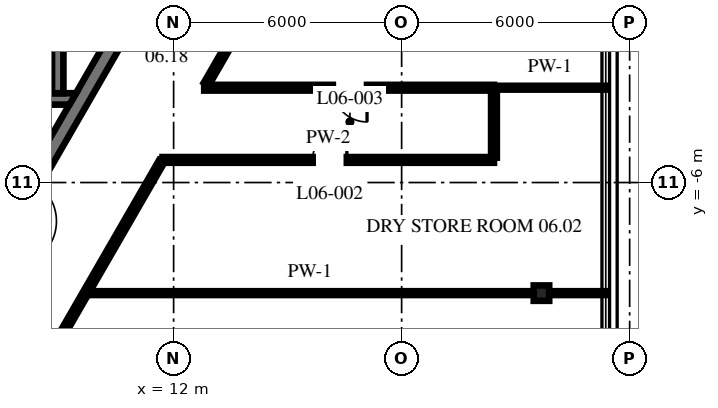
"""IFC4 building model, lengths in metres.
Left out: names, types, materials, properties, quantities, classifications, styles, units other than length and angle.
Written with IfcOpenShell. Run it as: python <this file> out.ifc"""

import sys

from ifc_helpers import new_model, si_unit, direction, frame, frame_2d, origin, origin_2d, place, context, subcontext, project, spatial, polyline, rectangle, i_section, outline, extrude, source, transform, mapped, element, fill, save


model = new_model("IFC4")
c1 = context("Model", 3, precision=1e-05, world=origin(), true_north=direction((0.0, 1.0)))
c2 = subcontext(c1, "Body", "Model", "MODEL_VIEW")
j1 = project(units=[si_unit("LENGTHUNIT", "METRE"), si_unit("PLANEANGLEUNIT", "RADIAN")], contexts=[c1])
p1 = place(None, origin())
s1 = spatial("IfcSite", under=j1, at=p1, CompositionType="ELEMENT")
p2 = place(p1, origin())
s2 = spatial("IfcBuilding", under=s1, at=p2, CompositionType="ELEMENT")
p3 = place(p2, frame((0.0, 0.0, 28.9)))
s3 = spatial("IfcBuildingStorey", under=s2, at=p3, CompositionType="ELEMENT", Elevation=28.9)
m1 = source(origin(), c2, "Body", "SweptSolid", [
    extrude(i_section(OverallWidth=0.404, OverallDepth=0.406, WebThickness=0.027, FlangeThickness=0.044, at=origin_2d()), origin(), (0.0, 0.0, 1.0), 4.3),
])
p4 = place(p3, frame((21.679, -8.91, 0.0), z_axis=(0.0, 0.0, 1.0), x_axis=(0.0, 1.0, 0.0)))
e1 = element("IfcColumn", 1, at=p4, inside=s3, PredefinedType="COLUMN", context=c2, shape_type="MappedRepresentation", body=[
    mapped(m1, transform((0.0, 0.0, 0.0), scale=1.0)),
])
m2 = source(origin(), c2, "Body", "SweptSolid", [
    extrude(outline(polyline([(-0.115, -0.2), (11.885, -0.2), (11.654, 0.2), (0.115, 0.2), (-0.115, -0.2)])), origin(), (0.0, 0.0, 1.0), 4.1),
])
p5 = place(p3, frame((5.885, -10.192, 0.0), z_axis=(0.0, 0.0, 1.0), x_axis=(0.499996592174, 0.866027371285, 0.0)))
e2 = element("IfcWall", 2, at=p5, inside=s3, PredefinedType="SHEAR", context=c2, shape_type="MappedRepresentation", body=[
    mapped(m2, transform((0.0, 0.0, 0.0), scale=1.0)),
])
p6 = place(p5, frame((3.665, 0.0, 0.0)))
e3 = element("IfcOpeningElement", 3, at=p6, cuts=e2, PredefinedType="OPENING", context=c2, shape_type="SweptSolid", body=[
    extrude(rectangle(XDim=1.2, YDim=2.1, at=frame_2d((0.6, 1.05))), frame((0.0, 0.21, 0.0), z_axis=(0.0, -1.0, 0.0), x_axis=(1.0, 0.0, 0.0)), (0.0, 0.0, 1.0), 0.42),
])
m3 = source(origin(), c2, "Body", "SweptSolid", [
    extrude(outline(polyline([(0.0, -0.15), (0.0, 0.15), (4.433, 0.15), (4.26, -0.15), (0.0, -0.15)])), origin(), (0.0, 0.0, 1.0), 4.1),
])
p7 = place(p3, frame((5.0, -3.8, 0.0), z_axis=(0.0, 0.0, 1.0), x_axis=(1.0, 0.0, 0.0)))
e4 = element("IfcWall", 4, at=p7, inside=s3, PredefinedType="SHEAR", context=c2, shape_type="MappedRepresentation", body=[
    mapped(m3, transform((0.0, 0.0, 0.0), scale=1.0)),
])
p8 = place(p7, frame((2.45, 0.0, 0.0)))
e5 = element("IfcOpeningElement", 5, at=p8, cuts=e4, PredefinedType="OPENING", context=c2, shape_type="SweptSolid", body=[
    extrude(rectangle(XDim=1.1, YDim=2.1, at=frame_2d((0.55, 1.05))), frame((0.0, 0.16, 0.0), z_axis=(0.0, -1.0, 0.0), x_axis=(1.0, 0.0, 0.0)), (0.0, 0.0, 1.0), 0.32),
])
m4 = source(origin(), c2, "Body", "SweptSolid", [
    extrude(rectangle(XDim=7.3, YDim=0.3, at=frame_2d((3.65, 0.0))), origin(), (0.0, 0.0, 1.0), 4.1),
])
p9 = place(p3, frame((8.95, -3.65, 0.0), z_axis=(0.0, 0.0, 1.0), x_axis=(0.0, 1.0, 0.0)))
e6 = element("IfcWall", 6, at=p9, inside=s3, PredefinedType="SHEAR", context=c2, shape_type="MappedRepresentation", body=[
    mapped(m4, transform((0.0, 0.0, 0.0), scale=1.0)),
])
m5 = source(origin(), c2, "Body", "SweptSolid", [
    extrude(rectangle(XDim=11.802, YDim=0.1, at=frame_2d((5.901, 0.0))), origin(), (0.0, 0.0, 1.0), 3.343),
])
p10 = place(p3, frame((9.685, -8.91, 0.0), z_axis=(0.0, 0.0, 1.0), x_axis=(1.0, 0.0, 0.0)))
e7 = element("IfcWall", 7, at=p10, inside=s3, PredefinedType="PARTITIONING", context=c2, shape_type="MappedRepresentation", body=[
    mapped(m5, transform((0.0, 0.0, 0.0), scale=1.0)),
])
m6 = source(origin(), c2, "Body", "SweptSolid", [
    extrude(rectangle(XDim=1.499, YDim=0.1, at=frame_2d((0.749, 0.0))), origin(), (0.0, 0.0, 1.0), 4.1),
])
p11 = place(p3, frame((21.873, -8.91, 0.0), z_axis=(0.0, 0.0, 1.0), x_axis=(1.0, 0.0, 0.0)))
e8 = element("IfcWall", 8, at=p11, inside=s3, PredefinedType="PARTITIONING", context=c2, shape_type="MappedRepresentation", body=[
    mapped(m6, transform((0.0, 0.0, 0.0), scale=1.0)),
])
m7 = source(origin(), c2, "Body", "SweptSolid", [
    extrude(rectangle(XDim=8.721, YDim=0.15, at=frame_2d((4.36, 0.0))), origin(), (0.0, 0.0, 1.0), 4.1),
])
p12 = place(p3, frame((11.708, -5.405, 0.0), z_axis=(0.0, 0.0, 1.0), x_axis=(1.0, 0.0, 0.0)))
e9 = element("IfcWall", 9, at=p12, inside=s3, PredefinedType="PARTITIONING", context=c2, shape_type="MappedRepresentation", body=[
    mapped(m7, transform((0.0, 0.0, 0.0), scale=1.0)),
])
p13 = place(p12, frame((3.95, 0.0, 0.0)))
e10 = element("IfcOpeningElement", 10, at=p13, cuts=e9, PredefinedType="OPENING", context=c2, shape_type="SweptSolid", body=[
    extrude(rectangle(XDim=0.9, YDim=2.1, at=frame_2d((0.45, 1.05))), frame((0.0, 0.085, 0.0), z_axis=(0.0, -1.0, 0.0), x_axis=(1.0, 0.0, 0.0)), (0.0, 0.0, 1.0), 0.17),
])
m8 = source(origin(), c2, "Body", "SweptSolid", [
    extrude(rectangle(XDim=7.624, YDim=0.15, at=frame_2d((3.812, 0.0))), origin(), (0.0, 0.0, 1.0), 4.1),
])
p14 = place(p3, frame((12.805, -3.505, 0.0), z_axis=(0.0, 0.0, 1.0), x_axis=(1.0, 0.0, 0.0)))
e11 = element("IfcWall", 11, at=p14, inside=s3, PredefinedType="PARTITIONING", context=c2, shape_type="MappedRepresentation", body=[
    mapped(m8, transform((0.0, 0.0, 0.0), scale=1.0)),
])
p15 = place(p14, frame((3.384, 0.0, 0.0)))
e12 = element("IfcOpeningElement", 12, at=p15, cuts=e11, PredefinedType="OPENING", context=c2, shape_type="SweptSolid", body=[
    extrude(rectangle(XDim=0.9, YDim=2.1, at=frame_2d((0.45, 1.05))), frame((0.0, 0.085, 0.0), z_axis=(0.0, -1.0, 0.0), x_axis=(1.0, 0.0, 0.0)), (0.0, 0.0, 1.0), 0.17),
])
m9 = source(origin(), c2, "Body", "SweptSolid", [
    extrude(rectangle(XDim=2.942, YDim=0.1, at=frame_2d((1.471, 0.0))), origin(), (0.0, 0.0, 1.0), 4.1),
])
p16 = place(p3, frame((20.429, -3.505, 0.0), z_axis=(0.0, 0.0, 1.0), x_axis=(1.0, 0.0, 0.0)))
e13 = element("IfcWall", 13, at=p16, inside=s3, PredefinedType="PARTITIONING", context=c2, shape_type="MappedRepresentation", body=[
    mapped(m9, transform((0.0, 0.0, 0.0), scale=1.0)),
])
m10 = source(origin(), c2, "Body", "SweptSolid", [
    extrude(rectangle(XDim=8.468, YDim=0.15, at=frame_2d((4.234, 0.0))), origin(), (0.0, 0.0, 1.0), 4.1),
])
p17 = place(p3, frame((7.449, -12.782, 0.0), z_axis=(0.0, 0.0, 1.0), x_axis=(0.499990325971, 0.866030989016, 0.0)))
e14 = element("IfcWall", 14, at=p17, inside=s3, PredefinedType="PARTITIONING", context=c2, shape_type="MappedRepresentation", body=[
    mapped(m10, transform((0.0, 0.0, 0.0), scale=1.0)),
])
p18 = place(p17, frame((1.78, 0.0, 0.0)))
e15 = element("IfcOpeningElement", 15, at=p18, cuts=e14, PredefinedType="OPENING", context=c2, shape_type="SweptSolid", body=[
    extrude(rectangle(XDim=0.9, YDim=2.1, at=frame_2d((0.45, 1.05))), frame((0.0, 0.085, 0.0), z_axis=(0.0, -1.0, 0.0), x_axis=(1.0, 0.0, 0.0)), (0.0, 0.0, 1.0), 0.17),
])
m11 = source(origin(), c2, "Body", "SweptSolid", [
    extrude(rectangle(XDim=3.867, YDim=0.15, at=frame_2d((1.934, 0.0))), origin(), (0.0, 0.0, 1.0), 4.1),
])
p19 = place(p3, frame((12.86, -3.41, 0.0), z_axis=(0.0, 0.0, 1.0), x_axis=(0.499995691662, 0.86602789119, 0.0)))
e16 = element("IfcWall", 16, at=p19, inside=s3, PredefinedType="PARTITIONING", context=c2, shape_type="MappedRepresentation", body=[
    mapped(m11, transform((0.0, 0.0, 0.0), scale=1.0)),
])
m12 = source(origin(), c2, "Body", "SweptSolid", [
    extrude(rectangle(XDim=1.78, YDim=0.15, at=frame_2d((0.89, 0.0))), origin(), (0.0, 0.0, 1.0), 4.1),
])
p20 = place(p3, frame((20.429, -5.345, 0.0), z_axis=(0.0, 0.0, 1.0), x_axis=(0.0, 1.0, 0.0)))
e17 = element("IfcWall", 17, at=p20, inside=s3, PredefinedType="PARTITIONING", context=c2, shape_type="MappedRepresentation", body=[
    mapped(m12, transform((0.0, 0.0, 0.0), scale=1.0)),
])
p21 = place(p13, origin())
e18 = element("IfcDoor", 18, at=p21, inside=s3, OperationType="SINGLE_SWING_LEFT", PredefinedType="DOOR", context=c2, shape_type="SweptSolid", body=[
    extrude(rectangle(XDim=0.9, YDim=2.1, at=frame_2d((0.45, 1.05))), frame((0.0, 0.025, 0.0), z_axis=(0.0, -1.0, 0.0), x_axis=(1.0, 0.0, 0.0)), (0.0, 0.0, 1.0), 0.05),
])
fill(e10, e18)
p22 = place(p15, origin())
e19 = element("IfcDoor", 19, at=p22, inside=s3, OperationType="SINGLE_SWING_RIGHT", PredefinedType="DOOR", context=c2, shape_type="SweptSolid", body=[
    extrude(rectangle(XDim=0.9, YDim=2.1, at=frame_2d((0.45, 1.05))), frame((0.0, 0.025, 0.0), z_axis=(0.0, -1.0, 0.0), x_axis=(1.0, 0.0, 0.0)), (0.0, 0.0, 1.0), 0.05),
])
fill(e12, e19)
save(model, sys.argv[1])
